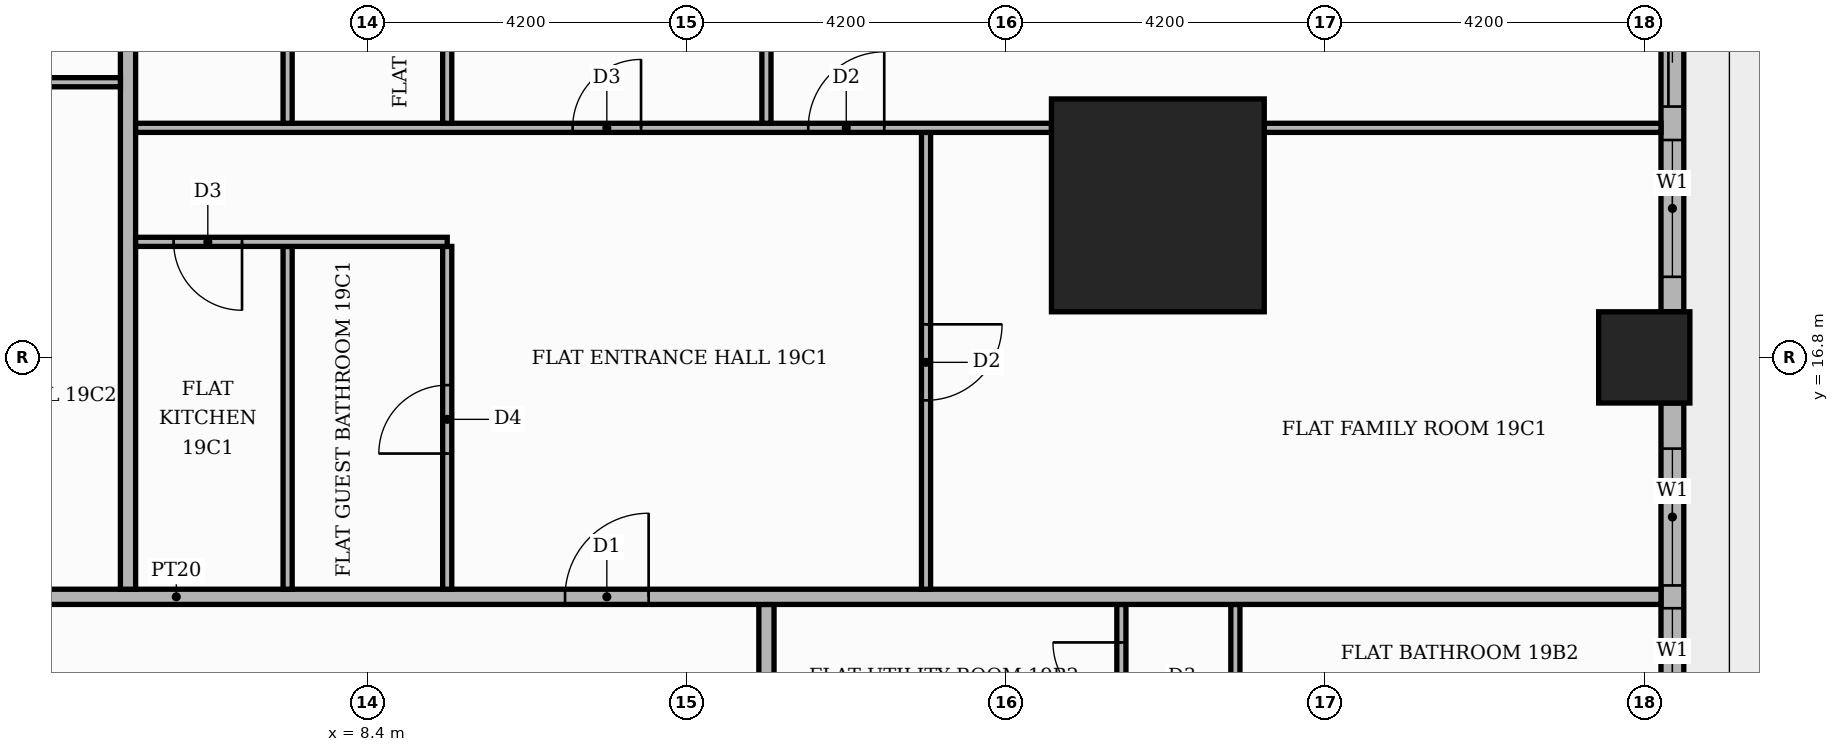
"""IFC4 building model, lengths in metres.
Left out: names, types, materials, properties, quantities, classifications, styles, units other than length and angle.
Written with IfcOpenShell. Run it as: python <this file> out.ifc"""

import sys

from ifc_helpers import new_model, si_unit, direction, frame, frame_2d, origin, origin_2d, place, context, subcontext, project, spatial, rectangle, extrude, element, fill, save


model = new_model("IFC4")
c1 = context("Model", 3, precision=1e-05, world=origin(), true_north=direction((0.0, 1.0)))
c2 = subcontext(c1, "Body", "Model", "MODEL_VIEW")
j1 = project(units=[si_unit("LENGTHUNIT", "METRE"), si_unit("PLANEANGLEUNIT", "RADIAN")], contexts=[c1])
p1 = place(None, origin())
s1 = spatial("IfcSite", under=j1, at=p1, CompositionType="ELEMENT")
p2 = place(p1, origin())
s2 = spatial("IfcBuilding", under=s1, at=p2, CompositionType="ELEMENT")
p3 = place(p2, frame((0.0, 0.0, 83.1)))
s3 = spatial("IfcBuildingStorey", under=s2, at=p3, CompositionType="ELEMENT", Elevation=83.1)
p4 = place(p3, frame((18.8, 18.8, 0.0), z_axis=(0.0, 0.0, 1.0), x_axis=(1.0, 0.0, 0.0)))
e1 = element("IfcColumn", 1, at=p4, inside=s3, PredefinedType="COLUMN", context=c2, shape_type="SweptSolid", body=[
    extrude(rectangle(XDim=2.8, YDim=2.8, at=origin_2d()), origin(), (0.0, 0.0, 1.0), 3.9),
])
p5 = place(p3, frame((25.2, 16.8, 0.0), z_axis=(0.0, 0.0, 1.0), x_axis=(1.0, 0.0, 0.0)))
e2 = element("IfcColumn", 2, at=p5, inside=s3, PredefinedType="COLUMN", context=c2, shape_type="SweptSolid", body=[
    extrude(rectangle(XDim=1.2, YDim=1.2, at=origin_2d()), origin(), (0.0, 0.0, 1.0), 3.9),
])
p6 = place(p3, frame((25.57, 9.0, 0.0), z_axis=(0.0, 0.0, 1.0), x_axis=(0.0, 1.0, 0.0)))
e3 = element("IfcWall", 3, at=p6, inside=s3, PredefinedType="STANDARD", context=c2, shape_type="SweptSolid", body=[
    extrude(rectangle(XDim=7.2, YDim=0.3, at=frame_2d((3.6, 0.0))), origin(), (0.0, 0.0, 1.0), 3.48),
])
p7 = place(p6, frame((0.6, 0.0, 0.9)))
e4 = element("IfcOpeningElement", 4, at=p7, cuts=e3, PredefinedType="OPENING", context=c2, shape_type="SweptSolid", body=[
    extrude(rectangle(XDim=1.8, YDim=2.1, at=frame_2d((0.9, 1.05))), frame((0.0, 0.16, 0.0), z_axis=(0.0, -1.0, 0.0), x_axis=(1.0, 0.0, 0.0)), (0.0, 0.0, 1.0), 0.32),
])
p8 = place(p6, frame((2.7, 0.0, 0.9)))
e5 = element("IfcOpeningElement", 5, at=p8, cuts=e3, PredefinedType="OPENING", context=c2, shape_type="SweptSolid", body=[
    extrude(rectangle(XDim=1.8, YDim=2.1, at=frame_2d((0.9, 1.05))), frame((0.0, 0.16, 0.0), z_axis=(0.0, -1.0, 0.0), x_axis=(1.0, 0.0, 0.0)), (0.0, 0.0, 1.0), 0.32),
])
p9 = place(p6, frame((4.8, 0.0, 0.9)))
e6 = element("IfcOpeningElement", 6, at=p9, cuts=e3, PredefinedType="OPENING", context=c2, shape_type="SweptSolid", body=[
    extrude(rectangle(XDim=1.8, YDim=2.1, at=frame_2d((0.9, 1.05))), frame((0.0, 0.16, 0.0), z_axis=(0.0, -1.0, 0.0), x_axis=(1.0, 0.0, 0.0)), (0.0, 0.0, 1.0), 0.32),
])
p10 = place(p3, frame((25.57, 17.4, 0.0), z_axis=(0.0, 0.0, 1.0), x_axis=(0.0, 1.0, 0.0)))
e7 = element("IfcWall", 7, at=p10, inside=s3, PredefinedType="STANDARD", context=c2, shape_type="SweptSolid", body=[
    extrude(rectangle(XDim=4.82, YDim=0.3, at=frame_2d((2.41, 0.0))), origin(), (0.0, 0.0, 1.0), 3.48),
])
p11 = place(p10, frame((2.7, 0.0, 0.0)))
e8 = element("IfcOpeningElement", 8, at=p11, cuts=e7, PredefinedType="OPENING", context=c2, shape_type="SweptSolid", body=[
    extrude(rectangle(XDim=1.8, YDim=2.4, at=frame_2d((0.9, 1.2))), frame((0.0, 0.16, 0.0), z_axis=(0.0, -1.0, 0.0), x_axis=(1.0, 0.0, 0.0)), (0.0, 0.0, 1.0), 0.32),
])
p12 = place(p10, frame((0.46, 0.0, 0.9)))
e9 = element("IfcOpeningElement", 9, at=p12, cuts=e7, PredefinedType="OPENING", context=c2, shape_type="SweptSolid", body=[
    extrude(rectangle(XDim=1.8, YDim=2.1, at=frame_2d((0.9, 1.05))), frame((0.0, 0.16, 0.0), z_axis=(0.0, -1.0, 0.0), x_axis=(1.0, 0.0, 0.0)), (0.0, 0.0, 1.0), 0.32),
])
p13 = place(p3, frame((13.65, -5.15, 0.0), z_axis=(0.0, 0.0, 1.0), x_axis=(0.0, 1.0, 0.0)))
e10 = element("IfcWall", 10, at=p13, inside=s3, PredefinedType="PARTITIONING", context=c2, shape_type="SweptSolid", body=[
    extrude(rectangle(XDim=18.7, YDim=0.2, at=frame_2d((9.35, 0.0))), origin(), (0.0, 0.0, 1.0), 3.48),
])
p14 = place(p13, frame((5.65, 0.0, 0.0)))
e11 = element("IfcOpeningElement", 11, at=p14, cuts=e10, PredefinedType="OPENING", context=c2, shape_type="SweptSolid", body=[
    extrude(rectangle(XDim=1.1, YDim=2.4, at=frame_2d((0.55, 1.2))), frame((0.0, 0.11, 0.0), z_axis=(0.0, -1.0, 0.0), x_axis=(1.0, 0.0, 0.0)), (0.0, 0.0, 1.0), 0.22),
])
p15 = place(p3, frame((18.32, 11.61, 0.0), z_axis=(0.0, 0.0, 1.0), x_axis=(0.0, 1.0, 0.0)))
e12 = element("IfcWall", 12, at=p15, inside=s3, PredefinedType="PARTITIONING", context=c2, shape_type="SweptSolid", body=[
    extrude(rectangle(XDim=1.94, YDim=0.12, at=frame_2d((0.97, 0.0))), origin(), (0.0, 0.0, 1.0), 3.48),
])
p16 = place(p15, frame((0.54, 0.0, 0.0)))
e13 = element("IfcOpeningElement", 13, at=p16, cuts=e12, PredefinedType="OPENING", context=c2, shape_type="SweptSolid", body=[
    extrude(rectangle(XDim=0.9, YDim=2.1, at=frame_2d((0.45, 1.05))), frame((0.0, 0.07, 0.0), z_axis=(0.0, -1.0, 0.0), x_axis=(1.0, 0.0, 0.0)), (0.0, 0.0, 1.0), 0.14),
])
p17 = place(p3, frame((19.82, 11.61, 0.0), z_axis=(0.0, 0.0, 1.0), x_axis=(0.0, 1.0, 0.0)))
e14 = element("IfcWall", 14, at=p17, inside=s3, PredefinedType="PARTITIONING", context=c2, shape_type="SweptSolid", body=[
    extrude(rectangle(XDim=1.94, YDim=0.12, at=frame_2d((0.97, 0.0))), origin(), (0.0, 0.0, 1.0), 3.48),
])
p18 = place(p3, frame((-13.65, 13.65, 0.0), z_axis=(0.0, 0.0, 1.0), x_axis=(1.0, 0.0, 0.0)))
e15 = element("IfcWall", 15, at=p18, inside=s3, PredefinedType="PARTITIONING", context=c2, shape_type="SweptSolid", body=[
    extrude(rectangle(XDim=39.07, YDim=0.2, at=frame_2d((19.535, 0.0))), origin(), (0.0, 0.0, 1.0), 3.48),
])
p19 = place(p18, frame((24.65, 0.0, 0.0)))
e16 = element("IfcOpeningElement", 16, at=p19, cuts=e15, PredefinedType="OPENING", context=c2, shape_type="SweptSolid", body=[
    extrude(rectangle(XDim=1.1, YDim=2.4, at=frame_2d((0.55, 1.2))), frame((0.0, 0.11, 0.0), z_axis=(0.0, -1.0, 0.0), x_axis=(1.0, 0.0, 0.0)), (0.0, 0.0, 1.0), 0.22),
])
p20 = place(p18, frame((16.25, 0.0, 0.0)))
e17 = element("IfcOpeningElement", 17, at=p20, cuts=e15, PredefinedType="OPENING", context=c2, shape_type="SweptSolid", body=[
    extrude(rectangle(XDim=1.1, YDim=2.4, at=frame_2d((0.55, 1.2))), frame((0.0, 0.11, 0.0), z_axis=(0.0, -1.0, 0.0), x_axis=(1.0, 0.0, 0.0)), (0.0, 0.0, 1.0), 0.22),
])
p21 = place(p3, frame((5.25, 13.75, 0.0), z_axis=(0.0, 0.0, 1.0), x_axis=(0.0, 1.0, 0.0)))
e18 = element("IfcWall", 18, at=p21, inside=s3, PredefinedType="PARTITIONING", context=c2, shape_type="SweptSolid", body=[
    extrude(rectangle(XDim=11.67, YDim=0.2, at=frame_2d((5.835, 0.0))), origin(), (0.0, 0.0, 1.0), 3.48),
])
p22 = place(p3, frame((7.35, 13.75, 0.0), z_axis=(0.0, 0.0, 1.0), x_axis=(0.0, 1.0, 0.0)))
e19 = element("IfcWall", 19, at=p22, inside=s3, PredefinedType="PARTITIONING", context=c2, shape_type="SweptSolid", body=[
    extrude(rectangle(XDim=4.51, YDim=0.12, at=frame_2d((2.255, 0.0))), origin(), (0.0, 0.0, 1.0), 3.48),
])
p23 = place(p3, frame((9.45, 13.75, 0.0), z_axis=(0.0, 0.0, 1.0), x_axis=(0.0, 1.0, 0.0)))
e20 = element("IfcWall", 20, at=p23, inside=s3, PredefinedType="PARTITIONING", context=c2, shape_type="SweptSolid", body=[
    extrude(rectangle(XDim=4.51, YDim=0.12, at=frame_2d((2.255, 0.0))), origin(), (0.0, 0.0, 1.0), 3.48),
])
p24 = place(p23, frame((1.785, 0.0, 0.0)))
e21 = element("IfcOpeningElement", 21, at=p24, cuts=e20, PredefinedType="OPENING", context=c2, shape_type="SweptSolid", body=[
    extrude(rectangle(XDim=0.9, YDim=2.1, at=frame_2d((0.45, 1.05))), frame((0.0, 0.07, 0.0), z_axis=(0.0, -1.0, 0.0), x_axis=(1.0, 0.0, 0.0)), (0.0, 0.0, 1.0), 0.14),
])
p25 = place(p3, frame((15.75, 13.75, 0.0), z_axis=(0.0, 0.0, 1.0), x_axis=(0.0, 1.0, 0.0)))
e22 = element("IfcWall", 22, at=p25, inside=s3, PredefinedType="PARTITIONING", context=c2, shape_type="SweptSolid", body=[
    extrude(rectangle(XDim=6.01, YDim=0.12, at=frame_2d((3.005, 0.0))), origin(), (0.0, 0.0, 1.0), 3.48),
])
p26 = place(p25, frame((2.485, 0.0, 0.0)))
e23 = element("IfcOpeningElement", 23, at=p26, cuts=e22, PredefinedType="OPENING", context=c2, shape_type="SweptSolid", body=[
    extrude(rectangle(XDim=1.0, YDim=2.1, at=frame_2d((0.5, 1.05))), frame((0.0, 0.07, 0.0), z_axis=(0.0, -1.0, 0.0), x_axis=(1.0, 0.0, 0.0)), (0.0, 0.0, 1.0), 0.14),
])
p27 = place(p3, frame((5.35, 18.32, 0.0), z_axis=(0.0, 0.0, 1.0), x_axis=(1.0, 0.0, 0.0)))
e24 = element("IfcWall", 24, at=p27, inside=s3, PredefinedType="PARTITIONING", context=c2, shape_type="SweptSolid", body=[
    extrude(rectangle(XDim=4.1, YDim=0.12, at=frame_2d((2.05, 0.0))), origin(), (0.0, 0.0, 1.0), 3.48),
])
p28 = place(p27, frame((0.5, 0.0, 0.0)))
e25 = element("IfcOpeningElement", 25, at=p28, cuts=e24, PredefinedType="OPENING", context=c2, shape_type="SweptSolid", body=[
    extrude(rectangle(XDim=0.9, YDim=2.1, at=frame_2d((0.45, 1.05))), frame((0.0, 0.07, 0.0), z_axis=(0.0, -1.0, 0.0), x_axis=(1.0, 0.0, 0.0)), (0.0, 0.0, 1.0), 0.14),
])
p29 = place(p3, frame((5.35, 19.82, 0.0), z_axis=(0.0, 0.0, 1.0), x_axis=(1.0, 0.0, 0.0)))
e26 = element("IfcWall", 26, at=p29, inside=s3, PredefinedType="PARTITIONING", context=c2, shape_type="SweptSolid", body=[
    extrude(rectangle(XDim=12.05, YDim=0.12, at=frame_2d((6.025, 0.0))), origin(), (0.0, 0.0, 1.0), 3.48),
])
p30 = place(p29, frame((8.85, 0.0, 0.0)))
e27 = element("IfcOpeningElement", 27, at=p30, cuts=e26, PredefinedType="OPENING", context=c2, shape_type="SweptSolid", body=[
    extrude(rectangle(XDim=1.0, YDim=2.1, at=frame_2d((0.5, 1.05))), frame((0.0, 0.07, 0.0), z_axis=(0.0, -1.0, 0.0), x_axis=(1.0, 0.0, 0.0)), (0.0, 0.0, 1.0), 0.14),
])
p31 = place(p29, frame((5.75, 0.0, 0.0)))
e28 = element("IfcOpeningElement", 28, at=p31, cuts=e26, PredefinedType="OPENING", context=c2, shape_type="SweptSolid", body=[
    extrude(rectangle(XDim=0.9, YDim=2.1, at=frame_2d((0.45, 1.05))), frame((0.0, 0.07, 0.0), z_axis=(0.0, -1.0, 0.0), x_axis=(1.0, 0.0, 0.0)), (0.0, 0.0, 1.0), 0.14),
])
p32 = place(p3, frame((20.2, 19.82, 0.0), z_axis=(0.0, 0.0, 1.0), x_axis=(1.0, 0.0, 0.0)))
e29 = element("IfcWall", 29, at=p32, inside=s3, PredefinedType="PARTITIONING", context=c2, shape_type="SweptSolid", body=[
    extrude(rectangle(XDim=5.22, YDim=0.12, at=frame_2d((2.61, 0.0))), origin(), (0.0, 0.0, 1.0), 3.48),
])
p33 = place(p3, frame((7.35, 19.88, 0.0), z_axis=(0.0, 0.0, 1.0), x_axis=(0.0, 1.0, 0.0)))
e30 = element("IfcWall", 30, at=p33, inside=s3, PredefinedType="PARTITIONING", context=c2, shape_type="SweptSolid", body=[
    extrude(rectangle(XDim=5.54, YDim=0.12, at=frame_2d((2.77, 0.0))), origin(), (0.0, 0.0, 1.0), 3.48),
])
p34 = place(p33, frame((2.44, 0.0, 0.0)))
e31 = element("IfcOpeningElement", 31, at=p34, cuts=e30, PredefinedType="OPENING", context=c2, shape_type="SweptSolid", body=[
    extrude(rectangle(XDim=0.9, YDim=2.1, at=frame_2d((0.45, 1.05))), frame((0.0, 0.07, 0.0), z_axis=(0.0, -1.0, 0.0), x_axis=(1.0, 0.0, 0.0)), (0.0, 0.0, 1.0), 0.14),
])
p35 = place(p3, frame((9.45, 19.88, 0.0), z_axis=(0.0, 0.0, 1.0), x_axis=(0.0, 1.0, 0.0)))
e32 = element("IfcWall", 32, at=p35, inside=s3, PredefinedType="PARTITIONING", context=c2, shape_type="SweptSolid", body=[
    extrude(rectangle(XDim=5.54, YDim=0.12, at=frame_2d((2.77, 0.0))), origin(), (0.0, 0.0, 1.0), 3.48),
])
p36 = place(p35, frame((2.44, 0.0, 0.0)))
e33 = element("IfcOpeningElement", 33, at=p36, cuts=e32, PredefinedType="OPENING", context=c2, shape_type="SweptSolid", body=[
    extrude(rectangle(XDim=0.9, YDim=2.1, at=frame_2d((0.45, 1.05))), frame((0.0, 0.07, 0.0), z_axis=(0.0, -1.0, 0.0), x_axis=(1.0, 0.0, 0.0)), (0.0, 0.0, 1.0), 0.14),
])
p37 = place(p3, frame((13.65, 19.88, 0.0), z_axis=(0.0, 0.0, 1.0), x_axis=(0.0, 1.0, 0.0)))
e34 = element("IfcWall", 34, at=p37, inside=s3, PredefinedType="PARTITIONING", context=c2, shape_type="SweptSolid", body=[
    extrude(rectangle(XDim=5.54, YDim=0.12, at=frame_2d((2.77, 0.0))), origin(), (0.0, 0.0, 1.0), 3.48),
])
p38 = place(p3, frame((-13.55, 20.42, 0.0), z_axis=(0.0, 0.0, 1.0), x_axis=(1.0, 0.0, 0.0)))
e35 = element("IfcWall", 35, at=p38, inside=s3, PredefinedType="PARTITIONING", context=c2, shape_type="SweptSolid", body=[
    extrude(rectangle(XDim=18.7, YDim=0.12, at=frame_2d((9.35, 0.0))), origin(), (0.0, 0.0, 1.0), 3.48),
])
p39 = place(p38, frame((16.2, 0.0, 0.0)))
e36 = element("IfcOpeningElement", 36, at=p39, cuts=e35, PredefinedType="OPENING", context=c2, shape_type="SweptSolid", body=[
    extrude(rectangle(XDim=1.0, YDim=2.1, at=frame_2d((0.5, 1.05))), frame((0.0, 0.07, 0.0), z_axis=(0.0, -1.0, 0.0), x_axis=(1.0, 0.0, 0.0)), (0.0, 0.0, 1.0), 0.14),
])
p40 = place(p38, frame((12.05, 0.0, 0.0)))
e37 = element("IfcOpeningElement", 37, at=p40, cuts=e35, PredefinedType="OPENING", context=c2, shape_type="SweptSolid", body=[
    extrude(rectangle(XDim=0.9, YDim=2.1, at=frame_2d((0.45, 1.05))), frame((0.0, 0.07, 0.0), z_axis=(0.0, -1.0, 0.0), x_axis=(1.0, 0.0, 0.0)), (0.0, 0.0, 1.0), 0.14),
])
p41 = place(p38, frame((5.75, 0.0, 0.0)))
e38 = element("IfcOpeningElement", 38, at=p41, cuts=e35, PredefinedType="OPENING", context=c2, shape_type="SweptSolid", body=[
    extrude(rectangle(XDim=0.9, YDim=2.1, at=frame_2d((0.45, 1.05))), frame((0.0, 0.07, 0.0), z_axis=(0.0, -1.0, 0.0), x_axis=(1.0, 0.0, 0.0)), (0.0, 0.0, 1.0), 0.14),
])
p42 = place(p8, origin())
e39 = element("IfcWindow", 39, at=p42, inside=s3, PartitioningType="SINGLE_PANEL", PredefinedType="WINDOW", context=c2, shape_type="SweptSolid", body=[
    extrude(rectangle(XDim=1.8, YDim=2.1, at=frame_2d((0.9, 1.05))), frame((0.0, 0.03, 0.0), z_axis=(0.0, -1.0, 0.0), x_axis=(1.0, 0.0, 0.0)), (0.0, 0.0, 1.0), 0.06),
])
fill(e5, e39)
p43 = place(p9, origin())
e40 = element("IfcWindow", 40, at=p43, inside=s3, PartitioningType="SINGLE_PANEL", PredefinedType="WINDOW", context=c2, shape_type="SweptSolid", body=[
    extrude(rectangle(XDim=1.8, YDim=2.1, at=frame_2d((0.9, 1.05))), frame((0.0, 0.03, 0.0), z_axis=(0.0, -1.0, 0.0), x_axis=(1.0, 0.0, 0.0)), (0.0, 0.0, 1.0), 0.06),
])
fill(e6, e40)
p44 = place(p11, origin())
e41 = element("IfcDoor", 41, at=p44, inside=s3, OperationType="SLIDING_TO_LEFT", PredefinedType="DOOR", context=c2, shape_type="SweptSolid", body=[
    extrude(rectangle(XDim=1.8, YDim=2.4, at=frame_2d((0.9, 1.2))), frame((0.0, 0.025, 0.0), z_axis=(0.0, -1.0, 0.0), x_axis=(1.0, 0.0, 0.0)), (0.0, 0.0, 1.0), 0.05),
])
fill(e8, e41)
p45 = place(p12, origin())
e42 = element("IfcWindow", 42, at=p45, inside=s3, PartitioningType="SINGLE_PANEL", PredefinedType="WINDOW", context=c2, shape_type="SweptSolid", body=[
    extrude(rectangle(XDim=1.8, YDim=2.1, at=frame_2d((0.9, 1.05))), frame((0.0, 0.03, 0.0), z_axis=(0.0, -1.0, 0.0), x_axis=(1.0, 0.0, 0.0)), (0.0, 0.0, 1.0), 0.06),
])
fill(e9, e42)
p46 = place(p16, origin())
e43 = element("IfcDoor", 43, at=p46, inside=s3, OperationType="SINGLE_SWING_RIGHT", PredefinedType="DOOR", context=c2, shape_type="SweptSolid", body=[
    extrude(rectangle(XDim=0.9, YDim=2.1, at=frame_2d((0.45, 1.05))), frame((0.0, 0.025, 0.0), z_axis=(0.0, -1.0, 0.0), x_axis=(1.0, 0.0, 0.0)), (0.0, 0.0, 1.0), 0.05),
])
fill(e13, e43)
p47 = place(p19, origin())
e44 = element("IfcDoor", 44, at=p47, inside=s3, OperationType="SINGLE_SWING_RIGHT", PredefinedType="DOOR", context=c2, shape_type="SweptSolid", body=[
    extrude(rectangle(XDim=1.1, YDim=2.4, at=frame_2d((0.55, 1.2))), frame((0.0, 0.025, 0.0), z_axis=(0.0, -1.0, 0.0), x_axis=(1.0, 0.0, 0.0)), (0.0, 0.0, 1.0), 0.05),
])
fill(e16, e44)
p48 = place(p26, frame((1.0, 0.0, 0.0), z_axis=(0.0, 0.0, 1.0), x_axis=(-1.0, 0.0, 0.0)))
e45 = element("IfcDoor", 45, at=p48, inside=s3, OperationType="SINGLE_SWING_RIGHT", PredefinedType="DOOR", context=c2, shape_type="SweptSolid", body=[
    extrude(rectangle(XDim=1.0, YDim=2.1, at=frame_2d((0.5, 1.05))), frame((0.0, 0.025, 0.0), z_axis=(0.0, -1.0, 0.0), x_axis=(1.0, 0.0, 0.0)), (0.0, 0.0, 1.0), 0.05),
])
fill(e23, e45)
p49 = place(p24, origin())
e46 = element("IfcDoor", 46, at=p49, inside=s3, OperationType="SINGLE_SWING_LEFT", PredefinedType="DOOR", context=c2, shape_type="SweptSolid", body=[
    extrude(rectangle(XDim=0.9, YDim=2.1, at=frame_2d((0.45, 1.05))), frame((0.0, 0.025, 0.0), z_axis=(0.0, -1.0, 0.0), x_axis=(1.0, 0.0, 0.0)), (0.0, 0.0, 1.0), 0.05),
])
fill(e21, e46)
p50 = place(p28, frame((0.9, 0.0, 0.0), z_axis=(0.0, 0.0, 1.0), x_axis=(-1.0, 0.0, 0.0)))
e47 = element("IfcDoor", 47, at=p50, inside=s3, OperationType="SINGLE_SWING_RIGHT", PredefinedType="DOOR", context=c2, shape_type="SweptSolid", body=[
    extrude(rectangle(XDim=0.9, YDim=2.1, at=frame_2d((0.45, 1.05))), frame((0.0, 0.025, 0.0), z_axis=(0.0, -1.0, 0.0), x_axis=(1.0, 0.0, 0.0)), (0.0, 0.0, 1.0), 0.05),
])
fill(e25, e47)
p51 = place(p30, origin())
e48 = element("IfcDoor", 48, at=p51, inside=s3, OperationType="SINGLE_SWING_RIGHT", PredefinedType="DOOR", context=c2, shape_type="SweptSolid", body=[
    extrude(rectangle(XDim=1.0, YDim=2.1, at=frame_2d((0.5, 1.05))), frame((0.0, 0.025, 0.0), z_axis=(0.0, -1.0, 0.0), x_axis=(1.0, 0.0, 0.0)), (0.0, 0.0, 1.0), 0.05),
])
fill(e27, e48)
p52 = place(p31, origin())
e49 = element("IfcDoor", 49, at=p52, inside=s3, OperationType="SINGLE_SWING_RIGHT", PredefinedType="DOOR", context=c2, shape_type="SweptSolid", body=[
    extrude(rectangle(XDim=0.9, YDim=2.1, at=frame_2d((0.45, 1.05))), frame((0.0, 0.025, 0.0), z_axis=(0.0, -1.0, 0.0), x_axis=(1.0, 0.0, 0.0)), (0.0, 0.0, 1.0), 0.05),
])
fill(e28, e49)
save(model, sys.argv[1])
